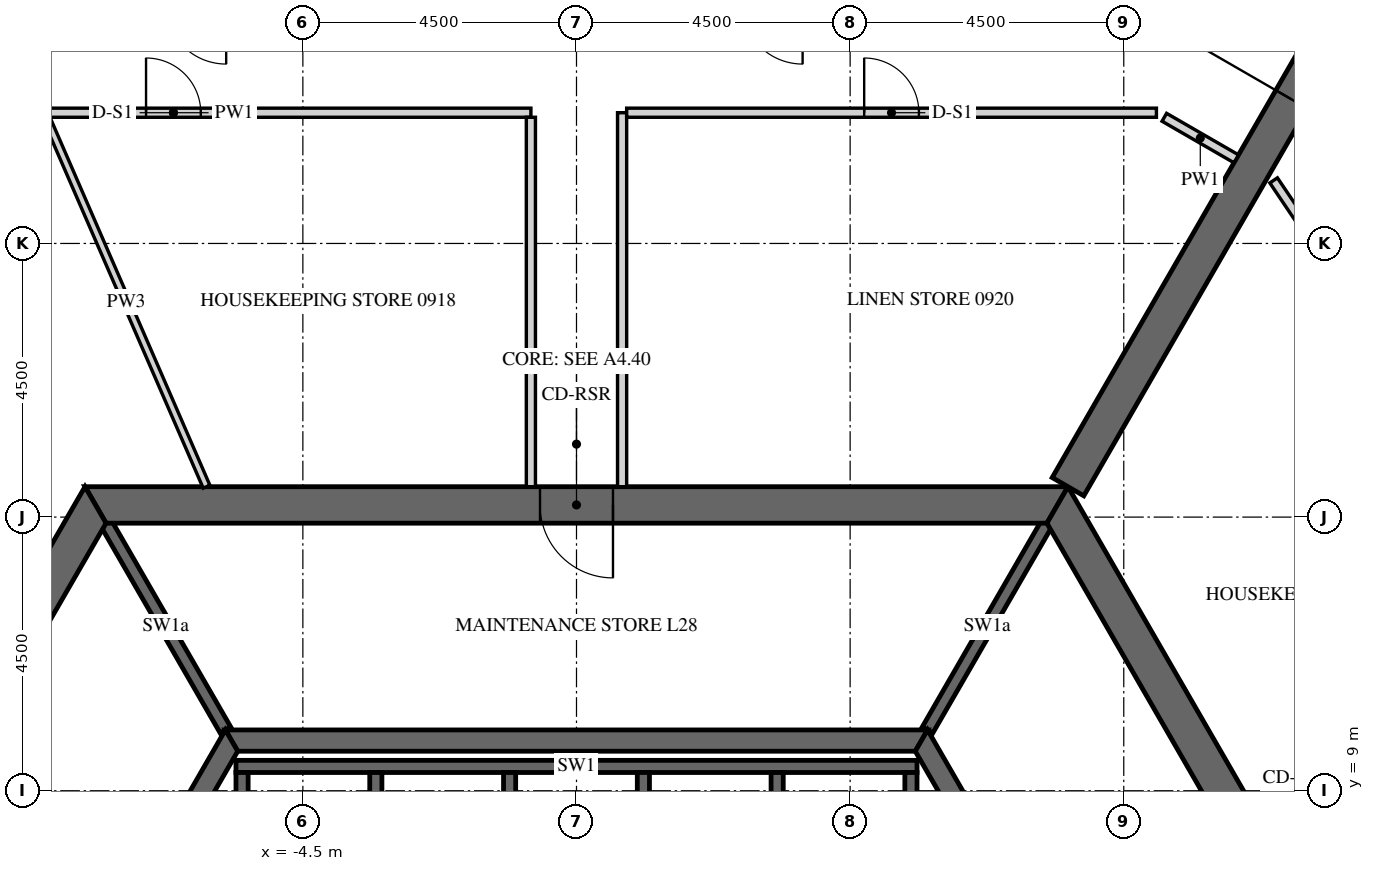
"""IFC4 building model, lengths in metres.
Left out: names, types, materials, properties, quantities, classifications, styles, units other than length and angle.
Written with IfcOpenShell. Run it as: python <this file> out.ifc"""

import sys

from ifc_helpers import new_model, si_unit, direction, frame, frame_2d, origin, place, context, subcontext, project, spatial, polyline, rectangle, outline, extrude, element, fill, save


model = new_model("IFC4")
c1 = context("Model", 3, precision=1e-05, world=origin(), true_north=direction((0.0, 1.0)))
c2 = subcontext(c1, "Body", "Model", "MODEL_VIEW")
j1 = project(units=[si_unit("LENGTHUNIT", "METRE"), si_unit("PLANEANGLEUNIT", "RADIAN")], contexts=[c1])
p1 = place(None, origin())
s1 = spatial("IfcSite", under=j1, at=p1, CompositionType="ELEMENT")
p2 = place(p1, origin())
s2 = spatial("IfcBuilding", under=s1, at=p2, CompositionType="ELEMENT")
p3 = place(p2, frame((0.0, 0.0, 123.3)))
s3 = spatial("IfcBuildingStorey", under=s2, at=p3, CompositionType="ELEMENT", Elevation=123.3)
p4 = place(p3, frame((-7.91, 13.7, -0.15), z_axis=(0.0, 0.0, 1.0), x_axis=(-0.499999880136, -0.866025472988, 0.0)))
e1 = element("IfcWall", 1, at=p4, inside=s3, PredefinedType="SHEAR", context=c2, shape_type="SweptSolid", body=[
    extrude(outline(polyline([(-0.173, -0.3), (15.993, -0.3), (15.646, 0.3), (0.173, 0.3), (-0.173, -0.3)])), origin(), (0.0, 0.0, 1.0), 3.9),
])
p5 = place(p4, frame((7.039, 0.0, 0.15)))
e2 = element("IfcOpeningElement", 2, at=p5, cuts=e1, PredefinedType="OPENING", context=c2, shape_type="SweptSolid", body=[
    extrude(rectangle(XDim=1.8, YDim=2.4, at=frame_2d((0.9, 1.2))), frame((0.0, 0.31, 0.0), z_axis=(0.0, -1.0, 0.0), x_axis=(1.0, 0.0, 0.0)), (0.0, 0.0, 1.0), 0.62),
])
p6 = place(p3, frame((15.819, 0.0, -0.15), z_axis=(0.0, 0.0, 1.0), x_axis=(-0.499999880136, 0.866025472988, 0.0)))
e3 = element("IfcWall", 3, at=p6, inside=s3, PredefinedType="SHEAR", context=c2, shape_type="SweptSolid", body=[
    extrude(outline(polyline([(-0.173, -0.3), (15.993, -0.3), (15.646, 0.3), (0.173, 0.3), (-0.173, -0.3)])), origin(), (0.0, 0.0, 1.0), 3.9),
])
p7 = place(p6, frame((6.981, 0.0, 0.15)))
e4 = element("IfcOpeningElement", 4, at=p7, cuts=e3, PredefinedType="OPENING", context=c2, shape_type="SweptSolid", body=[
    extrude(rectangle(XDim=1.8, YDim=2.4, at=frame_2d((0.9, 1.2))), frame((0.0, 0.31, 0.0), z_axis=(0.0, -1.0, 0.0), x_axis=(1.0, 0.0, 0.0)), (0.0, 0.0, 1.0), 0.62),
])
p8 = place(p3, frame((7.91, 13.7, -0.15), z_axis=(0.0, 0.0, 1.0), x_axis=(-1.0, 0.0, 0.0)))
e5 = element("IfcWall", 5, at=p8, inside=s3, PredefinedType="SHEAR", context=c2, shape_type="SweptSolid", body=[
    extrude(outline(polyline([(-0.173, -0.3), (15.993, -0.3), (15.646, 0.3), (0.173, 0.3), (-0.173, -0.3)])), origin(), (0.0, 0.0, 1.0), 3.9),
])
p9 = place(p8, frame((7.31, 0.0, 0.15)))
e6 = element("IfcOpeningElement", 6, at=p9, cuts=e5, PredefinedType="OPENING", context=c2, shape_type="SweptSolid", body=[
    extrude(rectangle(XDim=1.2, YDim=2.4, at=frame_2d((0.6, 1.2))), frame((0.0, 0.31, 0.0), z_axis=(0.0, -1.0, 0.0), x_axis=(1.0, 0.0, 0.0)), (0.0, 0.0, 1.0), 0.62),
])
p10 = place(p3, frame((8.083, 14.0, -0.15), z_axis=(0.0, 0.0, 1.0), x_axis=(0.499997680643, 0.866026742862, 0.0)))
e7 = element("IfcWall", 7, at=p10, inside=s3, PredefinedType="SHEAR", context=c2, shape_type="SweptSolid", body=[
    extrude(rectangle(XDim=16.509, YDim=0.6, at=frame_2d((8.254, 0.0))), origin(), (0.0, 0.0, 1.0), 3.9),
])
p11 = place(p10, frame((7.354, 0.0, 0.15)))
e8 = element("IfcOpeningElement", 8, at=p11, cuts=e7, PredefinedType="OPENING", context=c2, shape_type="SweptSolid", body=[
    extrude(rectangle(XDim=1.8, YDim=2.4, at=frame_2d((0.9, 1.2))), frame((0.0, 0.31, 0.0), z_axis=(0.0, -1.0, 0.0), x_axis=(1.0, 0.0, 0.0)), (0.0, 0.0, 1.0), 0.62),
])
p12 = place(p3, frame((-5.673, 9.825, -0.15), z_axis=(0.0, 0.0, 1.0), x_axis=(-0.499995046907, -0.866028263435, 0.0)))
e9 = element("IfcWall", 9, at=p12, inside=s3, PredefinedType="SHEAR", context=c2, shape_type="SweptSolid", body=[
    extrude(outline(polyline([(-0.101, -0.175), (11.446, -0.175), (11.244, 0.175), (0.101, 0.175), (-0.101, -0.175)])), origin(), (0.0, 0.0, 1.0), 3.9),
])
p13 = place(p12, frame((4.801, 0.0, 0.15)))
e10 = element("IfcOpeningElement", 10, at=p13, cuts=e9, PredefinedType="OPENING", context=c2, shape_type="SweptSolid", body=[
    extrude(rectangle(XDim=1.8, YDim=2.4, at=frame_2d((0.9, 1.2))), frame((0.0, 0.185, 0.0), z_axis=(0.0, -1.0, 0.0), x_axis=(1.0, 0.0, 0.0)), (0.0, 0.0, 1.0), 0.37),
])
p14 = place(p3, frame((11.345, 0.0, -0.15), z_axis=(0.0, 0.0, 1.0), x_axis=(-0.499995046907, 0.866028263435, 0.0)))
e11 = element("IfcWall", 11, at=p14, inside=s3, PredefinedType="SHEAR", context=c2, shape_type="SweptSolid", body=[
    extrude(outline(polyline([(-0.101, -0.175), (11.446, -0.175), (11.244, 0.175), (0.101, 0.175), (-0.101, -0.175)])), origin(), (0.0, 0.0, 1.0), 3.9),
])
p15 = place(p14, frame((4.744, 0.0, 0.15)))
e12 = element("IfcOpeningElement", 12, at=p15, cuts=e11, PredefinedType="OPENING", context=c2, shape_type="SweptSolid", body=[
    extrude(rectangle(XDim=1.8, YDim=2.4, at=frame_2d((0.9, 1.2))), frame((0.0, 0.185, 0.0), z_axis=(0.0, -1.0, 0.0), x_axis=(1.0, 0.0, 0.0)), (0.0, 0.0, 1.0), 0.37),
])
p16 = place(p3, frame((5.673, 9.825, -0.15), z_axis=(0.0, 0.0, 1.0), x_axis=(-1.0, 0.0, 0.0)))
e13 = element("IfcWall", 13, at=p16, inside=s3, PredefinedType="SHEAR", context=c2, shape_type="SweptSolid", body=[
    extrude(outline(polyline([(-0.101, -0.175), (11.446, -0.175), (11.244, 0.175), (0.101, 0.175), (-0.101, -0.175)])), origin(), (0.0, 0.0, 1.0), 3.9),
])
p17 = place(p3, frame((-5.6, 9.4, -0.25), z_axis=(0.0, 0.0, 1.0), x_axis=(1.0, 0.0, 0.0)))
e14 = element("IfcWall", 14, at=p17, inside=s3, PredefinedType="SHEAR", context=c2, shape_type="SweptSolid", body=[
    extrude(rectangle(XDim=11.2, YDim=0.2, at=frame_2d((5.6, 0.0))), origin(), (0.0, 0.0, 1.0), 3.9),
])
for number, where, z_axis, x_axis in (
    (15, (-5.5, 6.4, -0.25), (0.0, 0.0, 1.0), (0.0, 1.0, 0.0)),
    (16, (-3.3, 6.4, -0.25), (0.0, 0.0, 1.0), (0.0, 1.0, 0.0)),
    (17, (-1.1, 6.4, -0.25), (0.0, 0.0, 1.0), (0.0, 1.0, 0.0)),
    (18, (1.1, 6.4, -0.25), (0.0, 0.0, 1.0), (0.0, 1.0, 0.0)),
    (19, (3.3, 6.4, -0.25), (0.0, 0.0, 1.0), (0.0, 1.0, 0.0)),
    (20, (5.5, 6.4, -0.25), (0.0, 0.0, 1.0), (0.0, 1.0, 0.0)),
):
    element("IfcWall", number, at=place(p3, frame(where, z_axis=z_axis, x_axis=x_axis)), inside=s3, PredefinedType="SHEAR", context=c2, shape_type="SweptSolid", body=[
        extrude(rectangle(XDim=2.9, YDim=0.2, at=frame_2d((1.45, 0.0))), origin(), (0.0, 0.0, 1.0), 3.9),
    ])
for number, where, z_axis, x_axis in (
    (21, (5.773, 10.0, -0.15), (0.0, 0.0, 1.0), (0.5, 0.866, 0.0)),
    (22, (-5.773, 10.0, -0.15), (0.0, 0.0, 1.0), (-0.5, 0.866, 0.0)),
):
    element("IfcWall", number, at=place(p3, frame(where, z_axis=z_axis, x_axis=x_axis)), inside=s3, PredefinedType="SHEAR", context=c2, shape_type="SweptSolid", body=[
        extrude(rectangle(XDim=3.926, YDim=0.2, at=frame_2d((1.963, 0.0))), origin(), (0.0, 0.0, 1.0), 3.9),
    ])
p18 = place(p3, frame((-12.508, 20.15, 0.0), z_axis=(0.0, 0.0, 1.0), x_axis=(1.0, 0.0, 0.0)))
e23 = element("IfcWall", 23, at=p18, inside=s3, PredefinedType="PARTITIONING", context=c2, shape_type="SweptSolid", body=[
    extrude(rectangle(XDim=11.758, YDim=0.15, at=frame_2d((5.879, 0.0))), origin(), (0.0, 0.0, 1.0), 2.988),
])
p19 = place(p18, frame((5.429, 0.0, 0.0)))
e24 = element("IfcOpeningElement", 24, at=p19, cuts=e23, PredefinedType="OPENING", context=c2, shape_type="SweptSolid", body=[
    extrude(rectangle(XDim=0.9, YDim=2.1, at=frame_2d((0.45, 1.05))), frame((0.0, 0.085, 0.0), z_axis=(0.0, -1.0, 0.0), x_axis=(1.0, 0.0, 0.0)), (0.0, 0.0, 1.0), 0.17),
])
p20 = place(p3, frame((-0.75, 20.075, 0.0), z_axis=(0.0, 0.0, 1.0), x_axis=(0.0, -1.0, 0.0)))
e25 = element("IfcWall", 25, at=p20, inside=s3, PredefinedType="PARTITIONING", context=c2, shape_type="SweptSolid", body=[
    extrude(rectangle(XDim=6.075, YDim=0.15, at=frame_2d((3.038, 0.0))), origin(), (0.0, 0.0, 1.0), 2.988),
])
p21 = place(p3, frame((0.75, 14.0, 0.0), z_axis=(0.0, 0.0, 1.0), x_axis=(0.0, 1.0, 0.0)))
e26 = element("IfcWall", 26, at=p21, inside=s3, PredefinedType="PARTITIONING", context=c2, shape_type="SweptSolid", body=[
    extrude(rectangle(XDim=6.15, YDim=0.15, at=frame_2d((3.075, 0.0))), origin(), (0.0, 0.0, 1.0), 2.988),
])
p22 = place(p3, frame((0.825, 20.15, 0.0), z_axis=(0.0, 0.0, 1.0), x_axis=(1.0, 0.0, 0.0)))
e27 = element("IfcWall", 27, at=p22, inside=s3, PredefinedType="PARTITIONING", context=c2, shape_type="SweptSolid", body=[
    extrude(rectangle(XDim=8.712, YDim=0.15, at=frame_2d((4.356, 0.0))), origin(), (0.0, 0.0, 1.0), 2.988),
])
p23 = place(p22, frame((3.906, 0.0, 0.0)))
e28 = element("IfcOpeningElement", 28, at=p23, cuts=e27, PredefinedType="OPENING", context=c2, shape_type="SweptSolid", body=[
    extrude(rectangle(XDim=0.9, YDim=2.1, at=frame_2d((0.45, 1.05))), frame((0.0, 0.085, 0.0), z_axis=(0.0, -1.0, 0.0), x_axis=(1.0, 0.0, 0.0)), (0.0, 0.0, 1.0), 0.17),
])
p24 = place(p3, frame((9.667, 20.075, 0.0), z_axis=(0.0, 0.0, 1.0), x_axis=(0.866000994684, -0.500042275419, 0.0)))
e29 = element("IfcWall", 29, at=p24, inside=s3, PredefinedType="PARTITIONING", context=c2, shape_type="SweptSolid", body=[
    extrude(rectangle(XDim=1.366, YDim=0.15, at=frame_2d((0.683, 0.0))), origin(), (0.0, 0.0, 1.0), 2.988),
])
p25 = place(p3, frame((11.465, 19.037, 0.0), z_axis=(0.0, 0.0, 1.0), x_axis=(0.559196064773, -0.829035440221, 0.0)))
e30 = element("IfcWall", 30, at=p25, inside=s3, PredefinedType="PARTITIONING", context=c2, shape_type="SweptSolid", body=[
    extrude(rectangle(XDim=9.757, YDim=0.15, at=frame_2d((4.878, 0.0))), origin(), (0.0, 0.0, 1.0), 2.988),
])
p26 = place(p25, frame((4.428, 0.0, 0.0)))
e31 = element("IfcOpeningElement", 31, at=p26, cuts=e30, PredefinedType="OPENING", context=c2, shape_type="SweptSolid", body=[
    extrude(rectangle(XDim=0.9, YDim=2.1, at=frame_2d((0.45, 1.05))), frame((0.0, 0.085, 0.0), z_axis=(0.0, -1.0, 0.0), x_axis=(1.0, 0.0, 0.0)), (0.0, 0.0, 1.0), 0.17),
])
p27 = place(p3, frame((16.855, 10.911, 0.0), z_axis=(0.0, 0.0, 1.0), x_axis=(-0.866020343444, -0.500008764664, 0.0)))
e32 = element("IfcWall", 32, at=p27, inside=s3, PredefinedType="PARTITIONING", context=c2, shape_type="SweptSolid", body=[
    extrude(rectangle(XDim=6.053, YDim=0.15, at=frame_2d((3.026, 0.0))), origin(), (0.0, 0.0, 1.0), 2.988),
])
p28 = place(p3, frame((-8.724, 20.075, 0.0), z_axis=(0.0, 0.0, 1.0), x_axis=(0.398549547162, -0.917146803111, 0.0)))
e33 = element("IfcWall", 33, at=p28, inside=s3, PredefinedType="PARTITIONING", context=c2, shape_type="SweptSolid", body=[
    extrude(rectangle(XDim=6.624, YDim=0.12, at=frame_2d((3.312, 0.0))), origin(), (0.0, 0.0, 1.0), 2.988),
])
p29 = place(p9, origin())
e34 = element("IfcDoor", 34, at=p29, inside=s3, OperationType="SINGLE_SWING_LEFT", PredefinedType="DOOR", context=c2, shape_type="SweptSolid", body=[
    extrude(rectangle(XDim=1.2, YDim=2.4, at=frame_2d((0.6, 1.2))), frame((0.0, 0.025, 0.0), z_axis=(0.0, -1.0, 0.0), x_axis=(1.0, 0.0, 0.0)), (0.0, 0.0, 1.0), 0.05),
])
fill(e6, e34)
p30 = place(p11, origin())
e35 = element("IfcDoor", 35, at=p30, inside=s3, OperationType="DOUBLE_DOOR_SINGLE_SWING", PredefinedType="DOOR", context=c2, shape_type="SweptSolid", body=[
    extrude(rectangle(XDim=1.8, YDim=2.4, at=frame_2d((0.9, 1.2))), frame((0.0, 0.025, 0.0), z_axis=(0.0, -1.0, 0.0), x_axis=(1.0, 0.0, 0.0)), (0.0, 0.0, 1.0), 0.05),
])
fill(e8, e35)
p31 = place(p19, origin())
e36 = element("IfcDoor", 36, at=p31, inside=s3, OperationType="SINGLE_SWING_RIGHT", PredefinedType="DOOR", context=c2, shape_type="SweptSolid", body=[
    extrude(rectangle(XDim=0.9, YDim=2.1, at=frame_2d((0.45, 1.05))), frame((0.0, 0.025, 0.0), z_axis=(0.0, -1.0, 0.0), x_axis=(1.0, 0.0, 0.0)), (0.0, 0.0, 1.0), 0.05),
])
fill(e24, e36)
p32 = place(p23, origin())
e37 = element("IfcDoor", 37, at=p32, inside=s3, OperationType="SINGLE_SWING_RIGHT", PredefinedType="DOOR", context=c2, shape_type="SweptSolid", body=[
    extrude(rectangle(XDim=0.9, YDim=2.1, at=frame_2d((0.45, 1.05))), frame((0.0, 0.025, 0.0), z_axis=(0.0, -1.0, 0.0), x_axis=(1.0, 0.0, 0.0)), (0.0, 0.0, 1.0), 0.05),
])
fill(e28, e37)
save(model, sys.argv[1])
